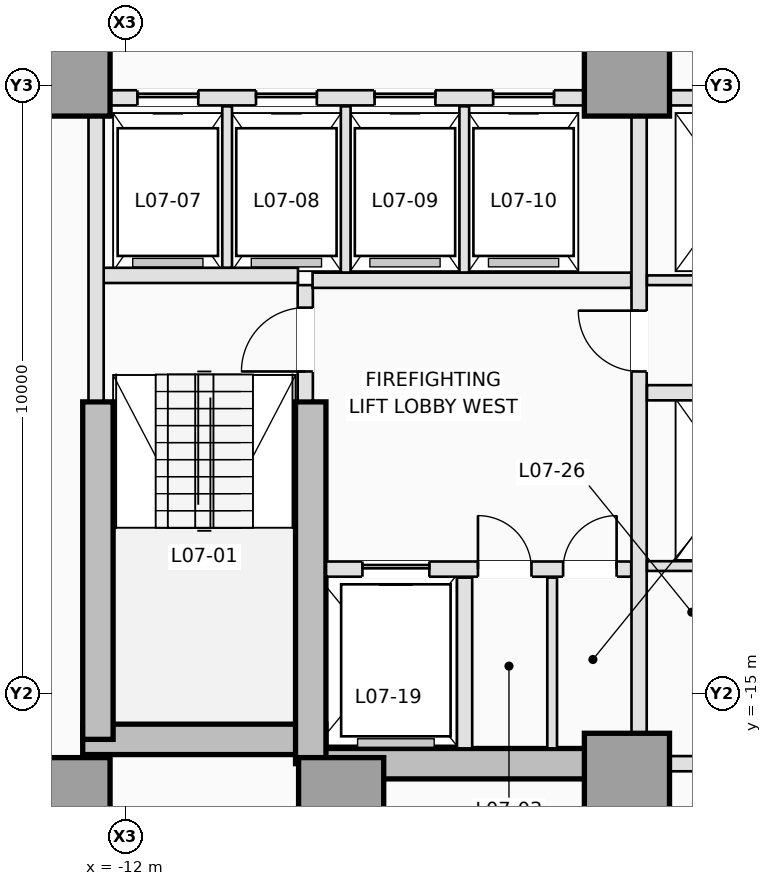
"""IFC4 building model, lengths in metres.
Left out: names, types, materials, properties, quantities, classifications, styles, units other than length and angle.
Written with IfcOpenShell. Run it as: python <this file> out.ifc"""

import sys

from ifc_helpers import new_model, si_unit, direction, frame, frame_2d, origin, origin_2d, place, context, subcontext, project, spatial, rectangle, extrude, element, fill, save


model = new_model("IFC4")
c1 = context("Model", 3, precision=1e-05, world=origin(), true_north=direction((0.0, 1.0)))
c2 = subcontext(c1, "Body", "Model", "MODEL_VIEW")
j1 = project(units=[si_unit("LENGTHUNIT", "METRE"), si_unit("PLANEANGLEUNIT", "RADIAN")], contexts=[c1])
p1 = place(None, origin())
s1 = spatial("IfcSite", under=j1, at=p1, CompositionType="ELEMENT")
p2 = place(p1, origin())
s2 = spatial("IfcBuilding", under=s1, at=p2, CompositionType="ELEMENT")
p3 = place(p2, frame((0.0, 0.0, 31.1)))
s3 = spatial("IfcBuildingStorey", under=s2, at=p3, CompositionType="ELEMENT", Elevation=31.1)
p4 = place(p3, frame((-12.7, -15.75, 0.0), z_axis=(0.0, 0.0, 1.0), x_axis=(1.0, 0.0, 0.0)))
e1 = element("IfcWall", 1, at=p4, inside=s3, PredefinedType="SHEAR", context=c2, shape_type="SweptSolid", body=[
    extrude(rectangle(XDim=4.0, YDim=0.5, at=frame_2d((2.0, 0.0))), origin(), (0.0, 0.0, 1.0), 3.5),
])
p5 = place(p3, frame((-8.95, -16.15, 0.0), z_axis=(0.0, 0.0, 1.0), x_axis=(1.0, 0.0, 0.0)))
e2 = element("IfcWall", 2, at=p5, inside=s3, PredefinedType="SHEAR", context=c2, shape_type="SweptSolid", body=[
    extrude(rectangle(XDim=5.2, YDim=0.5, at=frame_2d((2.6, 0.0))), origin(), (0.0, 0.0, 1.0), 3.5),
])
p6 = place(p3, frame((-12.45, -15.75, 0.0), z_axis=(0.0, 0.0, 1.0), x_axis=(0.0, 1.0, 0.0)))
e3 = element("IfcWall", 3, at=p6, inside=s3, PredefinedType="SHEAR", context=c2, shape_type="SweptSolid", body=[
    extrude(rectangle(XDim=5.55, YDim=0.5, at=frame_2d((2.775, 0.0))), origin(), (0.0, 0.0, 1.0), 3.5),
])
p7 = place(p3, frame((-8.95, -16.15, 0.0), z_axis=(0.0, 0.0, 1.0), x_axis=(0.0, 1.0, 0.0)))
e4 = element("IfcWall", 4, at=p7, inside=s3, PredefinedType="SHEAR", context=c2, shape_type="SweptSolid", body=[
    extrude(rectangle(XDim=5.95, YDim=0.5, at=frame_2d((2.975, 0.0))), origin(), (0.0, 0.0, 1.0), 3.5),
])
for number, where, z_axis, x_axis in (
    (5, (-12.95, -16.75, 0.0), (0.0, 0.0, 1.0), (1.0, 0.0, 0.0)),
    (6, (-8.45, -16.75, 0.0), (0.0, 0.0, 1.0), (1.0, 0.0, 0.0)),
    (7, (-3.75, -16.35, 0.0), (0.0, 0.0, 1.0), (1.0, 0.0, 0.0)),
    (8, (-12.95, -4.8, 0.0), (0.0, 0.0, 1.0), (1.0, 0.0, 0.0)),
    (9, (-3.75, -4.8, 0.0), (0.0, 0.0, 1.0), (1.0, 0.0, 0.0)),
):
    element("IfcColumn", number, at=place(p3, frame(where, z_axis=z_axis, x_axis=x_axis)), inside=s3, PredefinedType="COLUMN", context=c2, shape_type="SweptSolid", body=[
        extrude(rectangle(XDim=1.4, YDim=1.4, at=origin_2d()), origin(), (0.0, 0.0, 1.0), 3.5),
    ])
p8 = place(p3, frame((-9.04, -10.18, 0.0), z_axis=(0.0, 0.0, 1.0), x_axis=(0.0, 1.0, 0.0)))
e10 = element("IfcWall", 10, at=p8, inside=s3, PredefinedType="PARTITIONING", context=c2, shape_type="SweptSolid", body=[
    extrude(rectangle(XDim=1.9, YDim=0.25, at=frame_2d((0.95, 0.0))), origin(), (0.0, 0.0, 1.0), 3.25),
])
p9 = place(p8, frame((0.48, 0.0, 0.0)))
e11 = element("IfcOpeningElement", 11, at=p9, cuts=e10, PredefinedType="OPENING", context=c2, shape_type="SweptSolid", body=[
    extrude(rectangle(XDim=1.05, YDim=2.15, at=frame_2d((0.525, 1.075))), frame((0.0, 0.135, 0.0), z_axis=(0.0, -1.0, 0.0), x_axis=(1.0, 0.0, 0.0)), (0.0, 0.0, 1.0), 0.27),
])
p10 = place(p3, frame((-12.38, -8.12, 0.0), z_axis=(0.0, 0.0, 1.0), x_axis=(1.0, 0.0, 0.0)))
e12 = element("IfcWall", 12, at=p10, inside=s3, PredefinedType="PARTITIONING", context=c2, shape_type="SweptSolid", body=[
    extrude(rectangle(XDim=3.22, YDim=0.25, at=frame_2d((1.61, 0.0))), origin(), (0.0, 0.0, 1.0), 3.25),
])
p11 = place(p3, frame((-12.48, -10.18, 0.0), z_axis=(0.0, 0.0, 1.0), x_axis=(0.0, 1.0, 0.0)))
e13 = element("IfcWall", 13, at=p11, inside=s3, PredefinedType="PARTITIONING", context=c2, shape_type="SweptSolid", body=[
    extrude(rectangle(XDim=4.678, YDim=0.25, at=frame_2d((2.339, 0.0))), origin(), (0.0, 0.0, 1.0), 3.25),
])
p12 = place(p3, frame((-8.698, -12.95, 0.0), z_axis=(0.0, 0.0, 1.0), x_axis=(1.0, 0.0, 0.0)))
e14 = element("IfcWall", 14, at=p12, inside=s3, PredefinedType="PARTITIONING", context=c2, shape_type="SweptSolid", body=[
    extrude(rectangle(XDim=5.018, YDim=0.25, at=frame_2d((2.509, 0.0))), origin(), (0.0, 0.0, 1.0), 3.25),
])
p13 = place(p12, frame((0.598, 0.0, 0.0)))
e15 = element("IfcOpeningElement", 15, at=p13, cuts=e14, PredefinedType="OPENING", context=c2, shape_type="SweptSolid", body=[
    extrude(rectangle(XDim=1.1, YDim=2.15, at=frame_2d((0.55, 1.075))), frame((0.0, 0.135, 0.0), z_axis=(0.0, -1.0, 0.0), x_axis=(1.0, 0.0, 0.0)), (0.0, 0.0, 1.0), 0.27),
])
p14 = place(p12, frame((2.498, 0.0, 0.0)))
e16 = element("IfcOpeningElement", 16, at=p14, cuts=e14, PredefinedType="OPENING", context=c2, shape_type="SweptSolid", body=[
    extrude(rectangle(XDim=0.88, YDim=2.1, at=frame_2d((0.44, 1.05))), frame((0.0, 0.135, 0.0), z_axis=(0.0, -1.0, 0.0), x_axis=(1.0, 0.0, 0.0)), (0.0, 0.0, 1.0), 0.27),
])
p15 = place(p12, frame((3.898, 0.0, 0.0)))
e17 = element("IfcOpeningElement", 17, at=p15, cuts=e14, PredefinedType="OPENING", context=c2, shape_type="SweptSolid", body=[
    extrude(rectangle(XDim=0.88, YDim=2.1, at=frame_2d((0.44, 1.05))), frame((0.0, 0.135, 0.0), z_axis=(0.0, -1.0, 0.0), x_axis=(1.0, 0.0, 0.0)), (0.0, 0.0, 1.0), 0.27),
])
p16 = place(p3, frame((-6.42, -15.898, 0.0), z_axis=(0.0, 0.0, 1.0), x_axis=(0.0, 1.0, 0.0)))
e18 = element("IfcWall", 18, at=p16, inside=s3, PredefinedType="PARTITIONING", context=c2, shape_type="SweptSolid", body=[
    extrude(rectangle(XDim=2.808, YDim=0.25, at=frame_2d((1.404, 0.0))), origin(), (0.0, 0.0, 1.0), 3.25),
])
p17 = place(p3, frame((-4.98, -15.898, 0.0), z_axis=(0.0, 0.0, 1.0), x_axis=(0.0, 1.0, 0.0)))
e19 = element("IfcWall", 19, at=p17, inside=s3, PredefinedType="PARTITIONING", context=c2, shape_type="SweptSolid", body=[
    extrude(rectangle(XDim=2.808, YDim=0.16, at=frame_2d((1.404, 0.0))), origin(), (0.0, 0.0, 1.0), 3.25),
])
p18 = place(p3, frame((-8.92, -8.2, 0.0), z_axis=(0.0, 0.0, 1.0), x_axis=(1.0, 0.0, 0.0)))
e20 = element("IfcWall", 20, at=p18, inside=s3, PredefinedType="PARTITIONING", context=c2, shape_type="SweptSolid", body=[
    extrude(rectangle(XDim=5.24, YDim=0.25, at=frame_2d((2.62, 0.0))), origin(), (0.0, 0.0, 1.0), 3.25),
])
p19 = place(p3, frame((-3.55, -15.648, 0.0), z_axis=(0.0, 0.0, 1.0), x_axis=(0.0, 1.0, 0.0)))
e21 = element("IfcWall", 21, at=p19, inside=s3, PredefinedType="PARTITIONING", context=c2, shape_type="SweptSolid", body=[
    extrude(rectangle(XDim=10.146, YDim=0.25, at=frame_2d((5.073, 0.0))), origin(), (0.0, 0.0, 1.0), 3.25),
])
p20 = place(p19, frame((5.948, 0.0, 0.0)))
e22 = element("IfcOpeningElement", 22, at=p20, cuts=e21, PredefinedType="OPENING", context=c2, shape_type="SweptSolid", body=[
    extrude(rectangle(XDim=1.0, YDim=2.15, at=frame_2d((0.5, 1.075))), frame((0.0, 0.135, 0.0), z_axis=(0.0, -1.0, 0.0), x_axis=(1.0, 0.0, 0.0)), (0.0, 0.0, 1.0), 0.27),
])
p21 = place(p3, frame((-12.248, -5.2, 0.0), z_axis=(0.0, 0.0, 1.0), x_axis=(1.0, 0.0, 0.0)))
e23 = element("IfcWall", 23, at=p21, inside=s3, PredefinedType="PARTITIONING", context=c2, shape_type="SweptSolid", body=[
    extrude(rectangle(XDim=7.796, YDim=0.25, at=frame_2d((3.898, 0.0))), origin(), (0.0, 0.0, 1.0), 3.25),
])
p22 = place(p21, frame((0.448, 0.0, 0.0)))
e24 = element("IfcOpeningElement", 24, at=p22, cuts=e23, PredefinedType="OPENING", context=c2, shape_type="SweptSolid", body=[
    extrude(rectangle(XDim=1.0, YDim=2.15, at=frame_2d((0.5, 1.075))), frame((0.0, 0.135, 0.0), z_axis=(0.0, -1.0, 0.0), x_axis=(1.0, 0.0, 0.0)), (0.0, 0.0, 1.0), 0.27),
])
p23 = place(p21, frame((2.398, 0.0, 0.0)))
e25 = element("IfcOpeningElement", 25, at=p23, cuts=e23, PredefinedType="OPENING", context=c2, shape_type="SweptSolid", body=[
    extrude(rectangle(XDim=1.0, YDim=2.15, at=frame_2d((0.5, 1.075))), frame((0.0, 0.135, 0.0), z_axis=(0.0, -1.0, 0.0), x_axis=(1.0, 0.0, 0.0)), (0.0, 0.0, 1.0), 0.27),
])
p24 = place(p21, frame((4.348, 0.0, 0.0)))
e26 = element("IfcOpeningElement", 26, at=p24, cuts=e23, PredefinedType="OPENING", context=c2, shape_type="SweptSolid", body=[
    extrude(rectangle(XDim=1.0, YDim=2.15, at=frame_2d((0.5, 1.075))), frame((0.0, 0.135, 0.0), z_axis=(0.0, -1.0, 0.0), x_axis=(1.0, 0.0, 0.0)), (0.0, 0.0, 1.0), 0.27),
])
p25 = place(p21, frame((6.298, 0.0, 0.0)))
e27 = element("IfcOpeningElement", 27, at=p25, cuts=e23, PredefinedType="OPENING", context=c2, shape_type="SweptSolid", body=[
    extrude(rectangle(XDim=1.0, YDim=2.15, at=frame_2d((0.5, 1.075))), frame((0.0, 0.135, 0.0), z_axis=(0.0, -1.0, 0.0), x_axis=(1.0, 0.0, 0.0)), (0.0, 0.0, 1.0), 0.27),
])
p26 = place(p3, frame((-3.048, -5.2, 0.0), z_axis=(0.0, 0.0, 1.0), x_axis=(1.0, 0.0, 0.0)))
e28 = element("IfcWall", 28, at=p26, inside=s3, PredefinedType="PARTITIONING", context=c2, shape_type="SweptSolid", body=[
    extrude(rectangle(XDim=2.098, YDim=0.25, at=frame_2d((1.049, 0.0))), origin(), (0.0, 0.0, 1.0), 3.25),
])
p27 = place(p3, frame((-10.325, -7.993, 0.0), z_axis=(0.0, 0.0, 1.0), x_axis=(0.0, 1.0, 0.0)))
e29 = element("IfcWall", 29, at=p27, inside=s3, PredefinedType="PARTITIONING", context=c2, shape_type="SweptSolid", body=[
    extrude(rectangle(XDim=2.653, YDim=0.16, at=frame_2d((1.326, 0.0))), origin(), (0.0, 0.0, 1.0), 3.25),
])
for number, where, z_axis, x_axis in (
    (30, (-8.375, -8.073, 0.0), (0.0, 0.0, 1.0), (0.0, 1.0, 0.0)),
    (31, (-6.425, -8.073, 0.0), (0.0, 0.0, 1.0), (0.0, 1.0, 0.0)),
):
    element("IfcWall", number, at=place(p3, frame(where, z_axis=z_axis, x_axis=x_axis)), inside=s3, PredefinedType="PARTITIONING", context=c2, shape_type="SweptSolid", body=[
        extrude(rectangle(XDim=2.733, YDim=0.16, at=frame_2d((1.366, 0.0))), origin(), (0.0, 0.0, 1.0), 3.25),
    ])
p28 = place(p3, frame((-3.048, -16.15, 0.0), z_axis=(0.0, 0.0, 1.0), x_axis=(1.0, 0.0, 0.0)))
e32 = element("IfcWall", 32, at=p28, inside=s3, PredefinedType="PARTITIONING", context=c2, shape_type="SweptSolid", body=[
    extrude(rectangle(XDim=6.096, YDim=0.25, at=frame_2d((3.048, 0.0))), origin(), (0.0, 0.0, 1.0), 2.3),
])
p29 = place(p3, frame((-3.42, -8.2, 0.0), z_axis=(0.0, 0.0, 1.0), x_axis=(1.0, 0.0, 0.0)))
e33 = element("IfcWall", 33, at=p29, inside=s3, PredefinedType="PARTITIONING", context=c2, shape_type="SweptSolid", body=[
    extrude(rectangle(XDim=2.47, YDim=0.16, at=frame_2d((1.235, 0.0))), origin(), (0.0, 0.0, 1.0), 3.25),
])
p30 = place(p3, frame((-3.42, -10.05, 0.0), z_axis=(0.0, 0.0, 1.0), x_axis=(1.0, 0.0, 0.0)))
e34 = element("IfcWall", 34, at=p30, inside=s3, PredefinedType="PARTITIONING", context=c2, shape_type="SweptSolid", body=[
    extrude(rectangle(XDim=2.47, YDim=0.25, at=frame_2d((1.235, 0.0))), origin(), (0.0, 0.0, 1.0), 3.25),
])
p31 = place(p3, frame((-3.42, -12.9, 0.0), z_axis=(0.0, 0.0, 1.0), x_axis=(1.0, 0.0, 0.0)))
e35 = element("IfcWall", 35, at=p31, inside=s3, PredefinedType="PARTITIONING", context=c2, shape_type="SweptSolid", body=[
    extrude(rectangle(XDim=6.84, YDim=0.16, at=frame_2d((3.42, 0.0))), origin(), (0.0, 0.0, 1.0), 3.25),
])
p32 = place(p31, frame((2.98, 0.0, 0.0)))
e36 = element("IfcOpeningElement", 36, at=p32, cuts=e35, PredefinedType="OPENING", context=c2, shape_type="SweptSolid", body=[
    extrude(rectangle(XDim=0.88, YDim=2.12, at=frame_2d((0.44, 1.06))), frame((0.0, 0.09, 0.0), z_axis=(0.0, -1.0, 0.0), x_axis=(1.0, 0.0, 0.0)), (0.0, 0.0, 1.0), 0.18),
])
p33 = place(p22, origin())
e37 = element("IfcDoor", 37, at=p33, inside=s3, OperationType="SLIDING_TO_LEFT", PredefinedType="DOOR", context=c2, shape_type="SweptSolid", body=[
    extrude(rectangle(XDim=1.0, YDim=2.15, at=frame_2d((0.5, 1.075))), frame((0.0, 0.025, 0.0), z_axis=(0.0, -1.0, 0.0), x_axis=(1.0, 0.0, 0.0)), (0.0, 0.0, 1.0), 0.05),
])
fill(e24, e37)
p34 = place(p23, origin())
e38 = element("IfcDoor", 38, at=p34, inside=s3, OperationType="SLIDING_TO_LEFT", PredefinedType="DOOR", context=c2, shape_type="SweptSolid", body=[
    extrude(rectangle(XDim=1.0, YDim=2.15, at=frame_2d((0.5, 1.075))), frame((0.0, 0.025, 0.0), z_axis=(0.0, -1.0, 0.0), x_axis=(1.0, 0.0, 0.0)), (0.0, 0.0, 1.0), 0.05),
])
fill(e25, e38)
p35 = place(p24, origin())
e39 = element("IfcDoor", 39, at=p35, inside=s3, OperationType="SLIDING_TO_LEFT", PredefinedType="DOOR", context=c2, shape_type="SweptSolid", body=[
    extrude(rectangle(XDim=1.0, YDim=2.15, at=frame_2d((0.5, 1.075))), frame((0.0, 0.025, 0.0), z_axis=(0.0, -1.0, 0.0), x_axis=(1.0, 0.0, 0.0)), (0.0, 0.0, 1.0), 0.05),
])
fill(e26, e39)
p36 = place(p25, origin())
e40 = element("IfcDoor", 40, at=p36, inside=s3, OperationType="SLIDING_TO_LEFT", PredefinedType="DOOR", context=c2, shape_type="SweptSolid", body=[
    extrude(rectangle(XDim=1.0, YDim=2.15, at=frame_2d((0.5, 1.075))), frame((0.0, 0.025, 0.0), z_axis=(0.0, -1.0, 0.0), x_axis=(1.0, 0.0, 0.0)), (0.0, 0.0, 1.0), 0.05),
])
fill(e27, e40)
p37 = place(p13, origin())
e41 = element("IfcDoor", 41, at=p37, inside=s3, OperationType="SLIDING_TO_LEFT", PredefinedType="DOOR", context=c2, shape_type="SweptSolid", body=[
    extrude(rectangle(XDim=1.1, YDim=2.15, at=frame_2d((0.55, 1.075))), frame((0.0, 0.025, 0.0), z_axis=(0.0, -1.0, 0.0), x_axis=(1.0, 0.0, 0.0)), (0.0, 0.0, 1.0), 0.05),
])
fill(e15, e41)
p38 = place(p9, origin())
e42 = element("IfcDoor", 42, at=p38, inside=s3, OperationType="SINGLE_SWING_LEFT", PredefinedType="DOOR", context=c2, shape_type="SweptSolid", body=[
    extrude(rectangle(XDim=1.05, YDim=2.15, at=frame_2d((0.525, 1.075))), frame((0.0, 0.025, 0.0), z_axis=(0.0, -1.0, 0.0), x_axis=(1.0, 0.0, 0.0)), (0.0, 0.0, 1.0), 0.05),
])
fill(e11, e42)
p39 = place(p14, origin())
e43 = element("IfcDoor", 43, at=p39, inside=s3, OperationType="SINGLE_SWING_LEFT", PredefinedType="TRAPDOOR", context=c2, shape_type="SweptSolid", body=[
    extrude(rectangle(XDim=0.88, YDim=2.1, at=frame_2d((0.44, 1.05))), frame((0.0, 0.025, 0.0), z_axis=(0.0, -1.0, 0.0), x_axis=(1.0, 0.0, 0.0)), (0.0, 0.0, 1.0), 0.05),
])
fill(e16, e43)
p40 = place(p15, origin())
e44 = element("IfcDoor", 44, at=p40, inside=s3, OperationType="SINGLE_SWING_RIGHT", PredefinedType="TRAPDOOR", context=c2, shape_type="SweptSolid", body=[
    extrude(rectangle(XDim=0.88, YDim=2.1, at=frame_2d((0.44, 1.05))), frame((0.0, 0.025, 0.0), z_axis=(0.0, -1.0, 0.0), x_axis=(1.0, 0.0, 0.0)), (0.0, 0.0, 1.0), 0.05),
])
fill(e17, e44)
p41 = place(p20, origin())
e45 = element("IfcDoor", 45, at=p41, inside=s3, OperationType="SINGLE_SWING_RIGHT", PredefinedType="DOOR", context=c2, shape_type="SweptSolid", body=[
    extrude(rectangle(XDim=1.0, YDim=2.15, at=frame_2d((0.5, 1.075))), frame((0.0, 0.025, 0.0), z_axis=(0.0, -1.0, 0.0), x_axis=(1.0, 0.0, 0.0)), (0.0, 0.0, 1.0), 0.05),
])
fill(e22, e45)
save(model, sys.argv[1])
